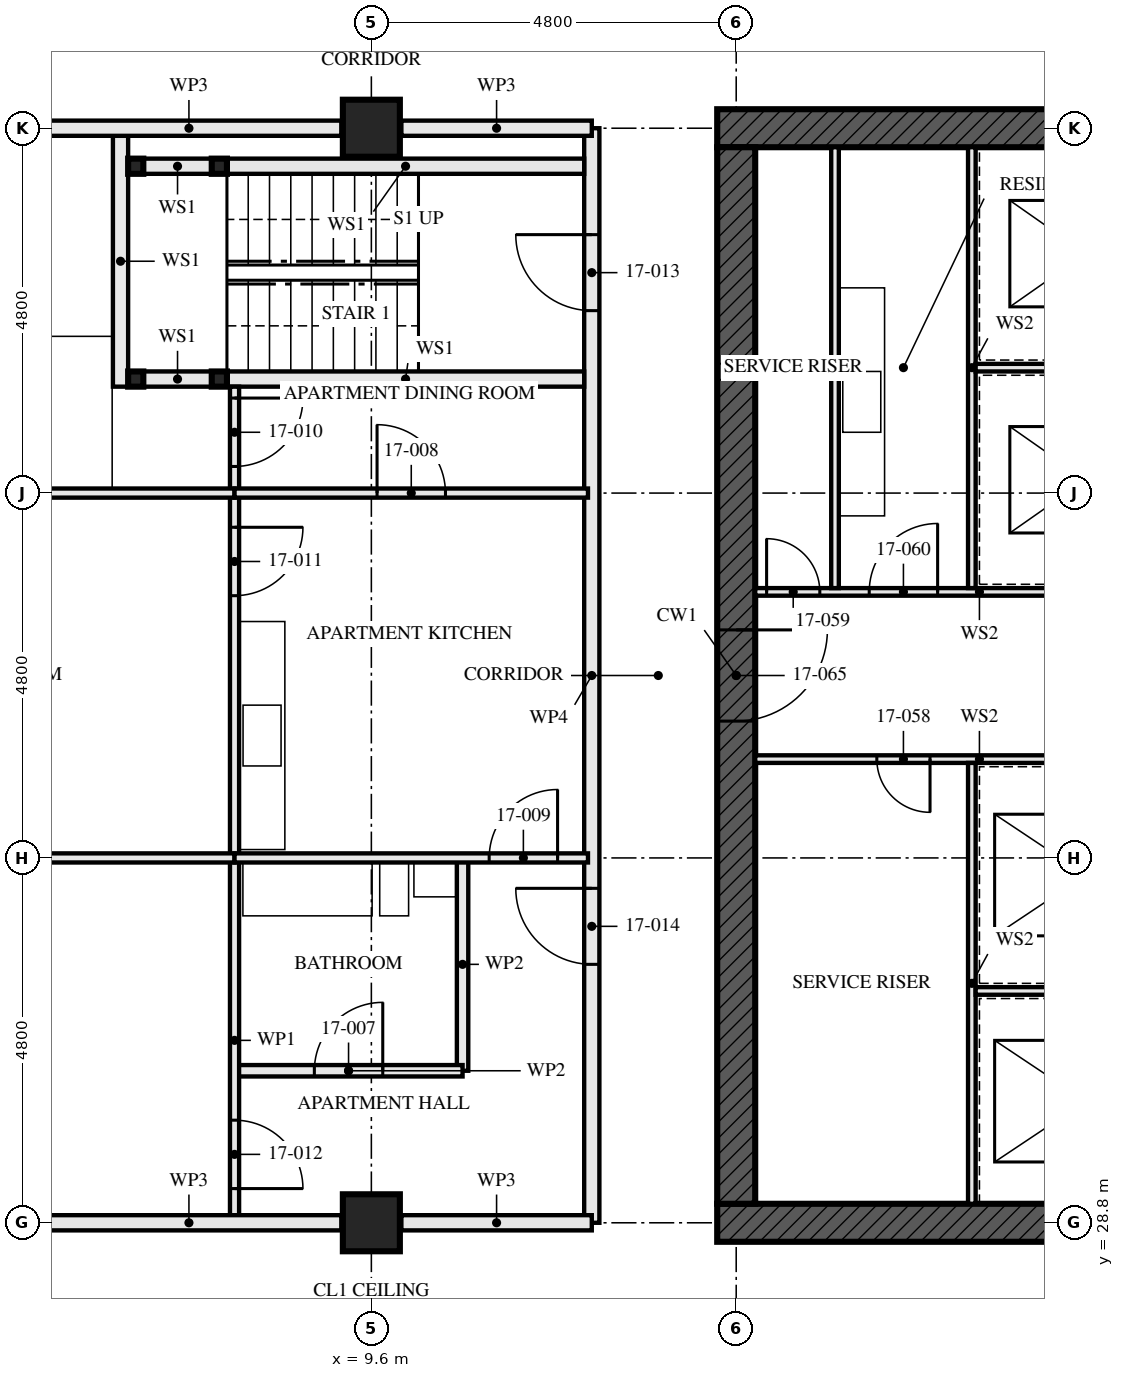
"""IFC4 building model, lengths in metres.
Left out: names, types, materials, properties, quantities, classifications, styles, units other than length and angle.
Written with IfcOpenShell. Run it as: python <this file> out.ifc"""

import sys

from ifc_helpers import new_model, si_unit, direction, frame, frame_2d, origin, origin_2d, place, context, subcontext, project, spatial, rectangle, hollow_rectangle, extrude, element, fill, save


model = new_model("IFC4")
c1 = context("Model", 3, precision=1e-05, world=origin(), true_north=direction((0.0, 1.0)))
c2 = subcontext(c1, "Body", "Model", "MODEL_VIEW")
j1 = project(units=[si_unit("LENGTHUNIT", "METRE"), si_unit("PLANEANGLEUNIT", "RADIAN")], contexts=[c1])
p1 = place(None, origin())
s1 = spatial("IfcSite", under=j1, at=p1, CompositionType="ELEMENT")
p2 = place(p1, origin())
s2 = spatial("IfcBuilding", under=s1, at=p2, CompositionType="ELEMENT")
p3 = place(p2, frame((0.0, 0.0, 65.5)))
s3 = spatial("IfcBuildingStorey", under=s2, at=p3, CompositionType="ELEMENT", Elevation=65.5)
for number, where, z_axis, x_axis in (
    (1, (9.6, 28.8, 0.0), (0.0, 0.0, 1.0), (0.0, 1.0, 0.0)),
    (2, (9.6, 43.2, 0.0), (0.0, 0.0, 1.0), (0.0, 1.0, 0.0)),
):
    element("IfcColumn", number, at=place(p3, frame(where, z_axis=z_axis, x_axis=x_axis)), inside=s3, PredefinedType="COLUMN", context=c2, shape_type="SweptSolid", body=[
        extrude(hollow_rectangle(XDim=0.75, YDim=0.75, WallThickness=0.08, at=origin_2d()), origin(), (0.0, 0.0, 1.0), 3.5),
    ])
p4 = place(p3, frame((14.15, 28.8, -0.17), z_axis=(0.0, 0.0, 1.0), x_axis=(1.0, 0.0, 0.0)))
e3 = element("IfcWall", 3, at=p4, inside=s3, PredefinedType="SHEAR", context=c2, shape_type="SweptSolid", body=[
    extrude(rectangle(XDim=14.9, YDim=0.5, at=frame_2d((7.45, 0.0))), origin(), (0.0, 0.0, 1.0), 3.5),
])
p5 = place(p4, frame((6.85, 0.0, 0.17)))
e4 = element("IfcOpeningElement", 4, at=p5, cuts=e3, PredefinedType="OPENING", context=c2, shape_type="SweptSolid", body=[
    extrude(rectangle(XDim=1.2, YDim=2.1, at=frame_2d((0.6, 1.05))), frame((0.0, 0.26, 0.0), z_axis=(0.0, -1.0, 0.0), x_axis=(1.0, 0.0, 0.0)), (0.0, 0.0, 1.0), 0.521),
])
p6 = place(p3, frame((29.05, 43.2, -0.17), z_axis=(0.0, 0.0, 1.0), x_axis=(-1.0, 0.0, 0.0)))
e5 = element("IfcWall", 5, at=p6, inside=s3, PredefinedType="SHEAR", context=c2, shape_type="SweptSolid", body=[
    extrude(rectangle(XDim=14.9, YDim=0.5, at=frame_2d((7.45, 0.0))), origin(), (0.0, 0.0, 1.0), 3.5),
])
p7 = place(p6, frame((6.85, 0.0, 0.17)))
e6 = element("IfcOpeningElement", 6, at=p7, cuts=e5, PredefinedType="OPENING", context=c2, shape_type="SweptSolid", body=[
    extrude(rectangle(XDim=1.2, YDim=2.1, at=frame_2d((0.6, 1.05))), frame((0.0, 0.26, 0.0), z_axis=(0.0, -1.0, 0.0), x_axis=(1.0, 0.0, 0.0)), (0.0, 0.0, 1.0), 0.521),
])
p8 = place(p3, frame((14.4, 42.95, -0.17), z_axis=(0.0, 0.0, 1.0), x_axis=(0.0, -1.0, 0.0)))
e7 = element("IfcWall", 7, at=p8, inside=s3, PredefinedType="SHEAR", context=c2, shape_type="SweptSolid", body=[
    extrude(rectangle(XDim=13.9, YDim=0.5, at=frame_2d((6.95, 0.0))), origin(), (0.0, 0.0, 1.0), 3.5),
])
p9 = place(p8, frame((6.35, 0.0, 0.17)))
e8 = element("IfcOpeningElement", 8, at=p9, cuts=e7, PredefinedType="OPENING", context=c2, shape_type="SweptSolid", body=[
    extrude(rectangle(XDim=1.2, YDim=2.1, at=frame_2d((0.6, 1.05))), frame((0.0, 0.26, 0.0), z_axis=(0.0, -1.0, 0.0), x_axis=(1.0, 0.0, 0.0)), (0.0, 0.0, 1.0), 0.521),
])
for number, where, z_axis, x_axis in (
    (9, (6.5, 42.7, 0.0), (0.0, 0.0, 1.0), (1.0, 0.0, 0.0)),
    (10, (6.5, 39.9, 0.0), (0.0, 0.0, 1.0), (1.0, 0.0, 0.0)),
    (11, (7.6, 42.7, 0.0), (0.0, 0.0, 1.0), (1.0, 0.0, 0.0)),
    (12, (7.6, 39.9, 0.0), (0.0, 0.0, 1.0), (1.0, 0.0, 0.0)),
):
    element("IfcColumn", number, at=place(p3, frame(where, z_axis=z_axis, x_axis=x_axis)), inside=s3, PredefinedType="COLUMN", context=c2, shape_type="SweptSolid", body=[
        extrude(hollow_rectangle(XDim=0.2, YDim=0.2, WallThickness=0.008, at=origin_2d()), origin(), (0.0, 0.0, 1.0), 3.33),
    ])
p10 = place(p3, frame((6.6, 42.7, 0.0), z_axis=(0.0, 0.0, 1.0), x_axis=(1.0, 0.0, 0.0)))
e13 = element("IfcWall", 13, at=p10, inside=s3, PredefinedType="SOLIDWALL", context=c2, shape_type="SweptSolid", body=[
    extrude(rectangle(XDim=0.9, YDim=0.2, at=frame_2d((0.45, 0.0))), origin(), (0.0, 0.0, 1.0), 2.99),
])
p11 = place(p3, frame((7.7, 42.7, 0.0), z_axis=(0.0, 0.0, 1.0), x_axis=(1.0, 0.0, 0.0)))
e14 = element("IfcWall", 14, at=p11, inside=s3, PredefinedType="SOLIDWALL", context=c2, shape_type="SweptSolid", body=[
    extrude(rectangle(XDim=4.7, YDim=0.2, at=frame_2d((2.35, 0.0))), origin(), (0.0, 0.0, 1.0), 2.99),
])
p12 = place(p3, frame((6.6, 39.9, 0.0), z_axis=(0.0, 0.0, 1.0), x_axis=(1.0, 0.0, 0.0)))
e15 = element("IfcWall", 15, at=p12, inside=s3, PredefinedType="SOLIDWALL", context=c2, shape_type="SweptSolid", body=[
    extrude(rectangle(XDim=0.9, YDim=0.2, at=frame_2d((0.45, 0.0))), origin(), (0.0, 0.0, 1.0), 2.99),
])
p13 = place(p3, frame((7.7, 39.9, 0.0), z_axis=(0.0, 0.0, 1.0), x_axis=(1.0, 0.0, 0.0)))
e16 = element("IfcWall", 16, at=p13, inside=s3, PredefinedType="SOLIDWALL", context=c2, shape_type="SweptSolid", body=[
    extrude(rectangle(XDim=4.7, YDim=0.2, at=frame_2d((2.35, 0.0))), origin(), (0.0, 0.0, 1.0), 2.99),
])
p14 = place(p3, frame((6.3, 43.1, 0.0), z_axis=(0.0, 0.0, 1.0), x_axis=(0.0, -1.0, 0.0)))
e17 = element("IfcWall", 17, at=p14, inside=s3, PredefinedType="SOLIDWALL", context=c2, shape_type="SweptSolid", body=[
    extrude(rectangle(XDim=3.3, YDim=0.2, at=frame_2d((1.65, 0.0))), origin(), (0.0, 0.0, 1.0), 3.33),
])
p15 = place(p3, frame((7.8, 30.8, 0.0), z_axis=(0.0, 0.0, 1.0), x_axis=(1.0, 0.0, 0.0)))
e18 = element("IfcWall", 18, at=p15, inside=s3, PredefinedType="PARTITIONING", context=c2, shape_type="SweptSolid", body=[
    extrude(rectangle(XDim=3.0, YDim=0.15, at=frame_2d((1.5, 0.0))), origin(), (0.0, 0.0, 1.0), 3.33),
])
p16 = place(p15, frame((1.05, 0.0, 0.0)))
e19 = element("IfcOpeningElement", 19, at=p16, cuts=e18, PredefinedType="OPENING", context=c2, shape_type="SweptSolid", body=[
    extrude(rectangle(XDim=0.9, YDim=2.1, at=frame_2d((0.45, 1.05))), frame((0.0, 0.085, 0.0), z_axis=(0.0, -1.0, 0.0), x_axis=(1.0, 0.0, 0.0)), (0.0, 0.0, 1.0), 0.171),
])
p17 = place(p3, frame((10.8, 33.6, 0.0), z_axis=(0.0, 0.0, 1.0), x_axis=(0.0, -1.0, 0.0)))
e20 = element("IfcWall", 20, at=p17, inside=s3, PredefinedType="PARTITIONING", context=c2, shape_type="SweptSolid", body=[
    extrude(rectangle(XDim=2.8, YDim=0.15, at=frame_2d((1.4, 0.0))), origin(), (0.0, 0.0, 1.0), 3.33),
])
p18 = place(p3, frame((7.8, 38.4, 0.0), z_axis=(0.0, 0.0, 1.0), x_axis=(1.0, 0.0, 0.0)))
e21 = element("IfcWall", 21, at=p18, inside=s3, PredefinedType="PARTITIONING", context=c2, shape_type="SweptSolid", body=[
    extrude(rectangle(XDim=4.65, YDim=0.12, at=frame_2d((2.325, 0.0))), origin(), (0.0, 0.0, 1.0), 2.55),
])
p19 = place(p18, frame((1.875, 0.0, 0.0)))
e22 = element("IfcOpeningElement", 22, at=p19, cuts=e21, PredefinedType="OPENING", context=c2, shape_type="SweptSolid", body=[
    extrude(rectangle(XDim=0.9, YDim=2.1, at=frame_2d((0.45, 1.05))), frame((0.0, 0.071, 0.0), z_axis=(0.0, -1.0, 0.0), x_axis=(1.0, 0.0, 0.0)), (0.0, 0.0, 1.0), 0.141),
])
p20 = place(p3, frame((7.8, 33.6, 0.0), z_axis=(0.0, 0.0, 1.0), x_axis=(1.0, 0.0, 0.0)))
e23 = element("IfcWall", 23, at=p20, inside=s3, PredefinedType="PARTITIONING", context=c2, shape_type="SweptSolid", body=[
    extrude(rectangle(XDim=4.65, YDim=0.12, at=frame_2d((2.325, 0.0))), origin(), (0.0, 0.0, 1.0), 2.55),
])
p21 = place(p20, frame((3.35, 0.0, 0.0)))
e24 = element("IfcOpeningElement", 24, at=p21, cuts=e23, PredefinedType="OPENING", context=c2, shape_type="SweptSolid", body=[
    extrude(rectangle(XDim=0.9, YDim=2.1, at=frame_2d((0.45, 1.05))), frame((0.0, 0.071, 0.0), z_axis=(0.0, -1.0, 0.0), x_axis=(1.0, 0.0, 0.0)), (0.0, 0.0, 1.0), 0.141),
])
p22 = place(p3, frame((7.8, 39.8, 0.0), z_axis=(0.0, 0.0, 1.0), x_axis=(0.0, -1.0, 0.0)))
e25 = element("IfcWall", 25, at=p22, inside=s3, PredefinedType="PARTITIONING", context=c2, shape_type="SweptSolid", body=[
    extrude(rectangle(XDim=1.4, YDim=0.12, at=frame_2d((0.7, 0.0))), origin(), (0.0, 0.0, 1.0), 3.33),
])
p23 = place(p22, frame((0.15, 0.0, 0.0)))
e26 = element("IfcOpeningElement", 26, at=p23, cuts=e25, PredefinedType="OPENING", context=c2, shape_type="SweptSolid", body=[
    extrude(rectangle(XDim=0.9, YDim=2.1, at=frame_2d((0.45, 1.05))), frame((0.0, 0.071, 0.0), z_axis=(0.0, -1.0, 0.0), x_axis=(1.0, 0.0, 0.0)), (0.0, 0.0, 1.0), 0.141),
])
p24 = place(p3, frame((7.8, 38.4, 0.0), z_axis=(0.0, 0.0, 1.0), x_axis=(0.0, -1.0, 0.0)))
e27 = element("IfcWall", 27, at=p24, inside=s3, PredefinedType="PARTITIONING", context=c2, shape_type="SweptSolid", body=[
    extrude(rectangle(XDim=4.8, YDim=0.12, at=frame_2d((2.4, 0.0))), origin(), (0.0, 0.0, 1.0), 3.33),
])
p25 = place(p24, frame((0.45, 0.0, 0.0)))
e28 = element("IfcOpeningElement", 28, at=p25, cuts=e27, PredefinedType="OPENING", context=c2, shape_type="SweptSolid", body=[
    extrude(rectangle(XDim=0.9, YDim=2.1, at=frame_2d((0.45, 1.05))), frame((0.0, 0.071, 0.0), z_axis=(0.0, -1.0, 0.0), x_axis=(1.0, 0.0, 0.0)), (0.0, 0.0, 1.0), 0.141),
])
p26 = place(p3, frame((7.8, 33.6, 0.0), z_axis=(0.0, 0.0, 1.0), x_axis=(0.0, -1.0, 0.0)))
e29 = element("IfcWall", 29, at=p26, inside=s3, PredefinedType="PARTITIONING", context=c2, shape_type="SweptSolid", body=[
    extrude(rectangle(XDim=4.8, YDim=0.12, at=frame_2d((2.4, 0.0))), origin(), (0.0, 0.0, 1.0), 3.33),
])
p27 = place(p26, frame((3.45, 0.0, 0.0)))
e30 = element("IfcOpeningElement", 30, at=p27, cuts=e29, PredefinedType="OPENING", context=c2, shape_type="SweptSolid", body=[
    extrude(rectangle(XDim=0.9, YDim=2.1, at=frame_2d((0.45, 1.05))), frame((0.0, 0.071, 0.0), z_axis=(0.0, -1.0, 0.0), x_axis=(1.0, 0.0, 0.0)), (0.0, 0.0, 1.0), 0.141),
])
for number, where, z_axis, x_axis in (
    (31, (0.32, 38.4, 0.0), (0.0, 0.0, 1.0), (1.0, 0.0, 0.0)),
    (32, (0.32, 33.6, 0.0), (0.0, 0.0, 1.0), (1.0, 0.0, 0.0)),
):
    element("IfcWall", number, at=place(p3, frame(where, z_axis=z_axis, x_axis=x_axis)), inside=s3, PredefinedType="PARTITIONING", context=c2, shape_type="SweptSolid", body=[
        extrude(rectangle(XDim=7.48, YDim=0.12, at=frame_2d((3.74, 0.0))), origin(), (0.0, 0.0, 1.0), 2.55),
    ])
p28 = place(p3, frame((12.5, 43.2, 0.0), z_axis=(0.0, 0.0, 1.0), x_axis=(0.0, -1.0, 0.0)))
e33 = element("IfcWall", 33, at=p28, inside=s3, PredefinedType="PARTITIONING", context=c2, shape_type="SweptSolid", body=[
    extrude(rectangle(XDim=14.4, YDim=0.2, at=frame_2d((7.2, 0.0))), origin(), (0.0, 0.0, 1.0), 2.55),
])
p29 = place(p28, frame((1.4, 0.0, 0.0)))
e34 = element("IfcOpeningElement", 34, at=p29, cuts=e33, PredefinedType="OPENING", context=c2, shape_type="SweptSolid", body=[
    extrude(rectangle(XDim=1.0, YDim=2.1, at=frame_2d((0.5, 1.05))), frame((0.0, 0.111, 0.0), z_axis=(0.0, -1.0, 0.0), x_axis=(1.0, 0.0, 0.0)), (0.0, 0.0, 1.0), 0.221),
])
p30 = place(p28, frame((10.0, 0.0, 0.0)))
e35 = element("IfcOpeningElement", 35, at=p30, cuts=e33, PredefinedType="OPENING", context=c2, shape_type="SweptSolid", body=[
    extrude(rectangle(XDim=1.0, YDim=2.1, at=frame_2d((0.5, 1.05))), frame((0.0, 0.111, 0.0), z_axis=(0.0, -1.0, 0.0), x_axis=(1.0, 0.0, 0.0)), (0.0, 0.0, 1.0), 0.221),
])
p31 = place(p3, frame((15.7, 37.15, 0.0), z_axis=(0.0, 0.0, 1.0), x_axis=(0.0, 1.0, 0.0)))
e36 = element("IfcWall", 36, at=p31, inside=s3, PredefinedType="SOLIDWALL", context=c2, shape_type="SweptSolid", body=[
    extrude(rectangle(XDim=5.8, YDim=0.1, at=frame_2d((2.9, 0.0))), origin(), (0.0, 0.0, 1.0), 3.33),
])
p32 = place(p3, frame((14.65, 34.9, 0.0), z_axis=(0.0, 0.0, 1.0), x_axis=(1.0, 0.0, 0.0)))
e37 = element("IfcWall", 37, at=p32, inside=s3, PredefinedType="SOLIDWALL", context=c2, shape_type="SweptSolid", body=[
    extrude(rectangle(XDim=5.9, YDim=0.1, at=frame_2d((2.95, 0.0))), origin(), (0.0, 0.0, 1.0), 3.33),
])
p33 = place(p32, frame((1.6, 0.0, 0.0)))
e38 = element("IfcOpeningElement", 38, at=p33, cuts=e37, PredefinedType="OPENING", context=c2, shape_type="SweptSolid", body=[
    extrude(rectangle(XDim=0.7, YDim=2.1, at=frame_2d((0.35, 1.05))), frame((0.0, 0.061, 0.0), z_axis=(0.0, -1.0, 0.0), x_axis=(1.0, 0.0, 0.0)), (0.0, 0.0, 1.0), 0.121),
])
p34 = place(p3, frame((14.65, 37.1, 0.0), z_axis=(0.0, 0.0, 1.0), x_axis=(1.0, 0.0, 0.0)))
e39 = element("IfcWall", 39, at=p34, inside=s3, PredefinedType="SOLIDWALL", context=c2, shape_type="SweptSolid", body=[
    extrude(rectangle(XDim=5.9, YDim=0.1, at=frame_2d((2.95, 0.0))), origin(), (0.0, 0.0, 1.0), 3.33),
])
p35 = place(p34, frame((0.15, 0.0, 0.0)))
e40 = element("IfcOpeningElement", 40, at=p35, cuts=e39, PredefinedType="OPENING", context=c2, shape_type="SweptSolid", body=[
    extrude(rectangle(XDim=0.7, YDim=2.1, at=frame_2d((0.35, 1.05))), frame((0.0, 0.061, 0.0), z_axis=(0.0, -1.0, 0.0), x_axis=(1.0, 0.0, 0.0)), (0.0, 0.0, 1.0), 0.121),
])
p36 = place(p34, frame((1.5, 0.0, 0.0)))
e41 = element("IfcOpeningElement", 41, at=p36, cuts=e39, PredefinedType="OPENING", context=c2, shape_type="SweptSolid", body=[
    extrude(rectangle(XDim=0.9, YDim=2.1, at=frame_2d((0.45, 1.05))), frame((0.0, 0.061, 0.0), z_axis=(0.0, -1.0, 0.0), x_axis=(1.0, 0.0, 0.0)), (0.0, 0.0, 1.0), 0.121),
])
p37 = place(p3, frame((17.5, 29.05, 0.0), z_axis=(0.0, 0.0, 1.0), x_axis=(0.0, 1.0, 0.0)))
e42 = element("IfcWall", 42, at=p37, inside=s3, PredefinedType="SOLIDWALL", context=c2, shape_type="SweptSolid", body=[
    extrude(rectangle(XDim=5.8, YDim=0.1, at=frame_2d((2.9, 0.0))), origin(), (0.0, 0.0, 1.0), 3.33),
])
p38 = place(p3, frame((17.55, 31.85, 0.0), z_axis=(0.0, 0.0, 1.0), x_axis=(1.0, 0.0, 0.0)))
e43 = element("IfcWall", 43, at=p38, inside=s3, PredefinedType="SOLIDWALL", context=c2, shape_type="SweptSolid", body=[
    extrude(rectangle(XDim=2.9, YDim=0.1, at=frame_2d((1.45, 0.0))), origin(), (0.0, 0.0, 1.0), 3.33),
])
p39 = place(p3, frame((17.5, 37.15, 0.0), z_axis=(0.0, 0.0, 1.0), x_axis=(0.0, 1.0, 0.0)))
e44 = element("IfcWall", 44, at=p39, inside=s3, PredefinedType="SOLIDWALL", context=c2, shape_type="SweptSolid", body=[
    extrude(rectangle(XDim=5.8, YDim=0.1, at=frame_2d((2.9, 0.0))), origin(), (0.0, 0.0, 1.0), 3.33),
])
p40 = place(p3, frame((17.55, 40.05, 0.0), z_axis=(0.0, 0.0, 1.0), x_axis=(1.0, 0.0, 0.0)))
e45 = element("IfcWall", 45, at=p40, inside=s3, PredefinedType="SOLIDWALL", context=c2, shape_type="SweptSolid", body=[
    extrude(rectangle(XDim=2.9, YDim=0.1, at=frame_2d((1.45, 0.0))), origin(), (0.0, 0.0, 1.0), 3.33),
])
p41 = place(p3, frame((12.5, 28.8, 0.0), z_axis=(0.0, 0.0, 1.0), x_axis=(-1.0, 0.0, 0.0)))
e46 = element("IfcWall", 46, at=p41, inside=s3, PredefinedType="PARTITIONING", context=c2, shape_type="SweptSolid", body=[
    extrude(rectangle(XDim=2.505, YDim=0.2, at=frame_2d((1.252, 0.0))), origin(), (0.0, 0.0, 1.0), 2.32),
])
p42 = place(p3, frame((9.205, 28.8, 0.0), z_axis=(0.0, 0.0, 1.0), x_axis=(-1.0, 0.0, 0.0)))
e47 = element("IfcWall", 47, at=p42, inside=s3, PredefinedType="PARTITIONING", context=c2, shape_type="SweptSolid", body=[
    extrude(rectangle(XDim=4.01, YDim=0.2, at=frame_2d((2.005, 0.0))), origin(), (0.0, 0.0, 1.0), 2.32),
])
p43 = place(p3, frame((12.5, 43.2, 0.0), z_axis=(0.0, 0.0, 1.0), x_axis=(-1.0, 0.0, 0.0)))
e48 = element("IfcWall", 48, at=p43, inside=s3, PredefinedType="PARTITIONING", context=c2, shape_type="SweptSolid", body=[
    extrude(rectangle(XDim=2.505, YDim=0.2, at=frame_2d((1.252, 0.0))), origin(), (0.0, 0.0, 1.0), 2.32),
])
p44 = place(p3, frame((9.205, 43.2, 0.0), z_axis=(0.0, 0.0, 1.0), x_axis=(-1.0, 0.0, 0.0)))
e49 = element("IfcWall", 49, at=p44, inside=s3, PredefinedType="PARTITIONING", context=c2, shape_type="SweptSolid", body=[
    extrude(rectangle(XDim=4.01, YDim=0.2, at=frame_2d((2.005, 0.0))), origin(), (0.0, 0.0, 1.0), 2.32),
])
p45 = place(p16, origin())
e50 = element("IfcDoor", 50, at=p45, inside=s3, OperationType="SINGLE_SWING_LEFT", PredefinedType="DOOR", context=c2, shape_type="SweptSolid", body=[
    extrude(rectangle(XDim=0.9, YDim=2.1, at=frame_2d((0.45, 1.05))), frame((0.0, 0.022, 0.0), z_axis=(0.0, -1.0, 0.0), x_axis=(1.0, 0.0, 0.0)), (0.0, 0.0, 1.0), 0.044),
])
fill(e19, e50)
p46 = place(p19, origin())
e51 = element("IfcDoor", 51, at=p46, inside=s3, OperationType="SINGLE_SWING_RIGHT", PredefinedType="DOOR", context=c2, shape_type="SweptSolid", body=[
    extrude(rectangle(XDim=0.9, YDim=2.1, at=frame_2d((0.45, 1.05))), frame((0.0, 0.022, 0.0), z_axis=(0.0, -1.0, 0.0), x_axis=(1.0, 0.0, 0.0)), (0.0, 0.0, 1.0), 0.044),
])
fill(e22, e51)
p47 = place(p21, origin())
e52 = element("IfcDoor", 52, at=p47, inside=s3, OperationType="SINGLE_SWING_LEFT", PredefinedType="DOOR", context=c2, shape_type="SweptSolid", body=[
    extrude(rectangle(XDim=0.9, YDim=2.1, at=frame_2d((0.45, 1.05))), frame((0.0, 0.022, 0.0), z_axis=(0.0, -1.0, 0.0), x_axis=(1.0, 0.0, 0.0)), (0.0, 0.0, 1.0), 0.044),
])
fill(e24, e52)
p48 = place(p23, origin())
e53 = element("IfcDoor", 53, at=p48, inside=s3, OperationType="SINGLE_SWING_RIGHT", PredefinedType="DOOR", context=c2, shape_type="SweptSolid", body=[
    extrude(rectangle(XDim=0.9, YDim=2.1, at=frame_2d((0.45, 1.05))), frame((0.0, 0.022, 0.0), z_axis=(0.0, -1.0, 0.0), x_axis=(1.0, 0.0, 0.0)), (0.0, 0.0, 1.0), 0.044),
])
fill(e26, e53)
p49 = place(p25, origin())
e54 = element("IfcDoor", 54, at=p49, inside=s3, OperationType="SINGLE_SWING_RIGHT", PredefinedType="DOOR", context=c2, shape_type="SweptSolid", body=[
    extrude(rectangle(XDim=0.9, YDim=2.1, at=frame_2d((0.45, 1.05))), frame((0.0, 0.022, 0.0), z_axis=(0.0, -1.0, 0.0), x_axis=(1.0, 0.0, 0.0)), (0.0, 0.0, 1.0), 0.044),
])
fill(e28, e54)
p50 = place(p27, origin())
e55 = element("IfcDoor", 55, at=p50, inside=s3, OperationType="SINGLE_SWING_LEFT", PredefinedType="DOOR", context=c2, shape_type="SweptSolid", body=[
    extrude(rectangle(XDim=0.9, YDim=2.1, at=frame_2d((0.45, 1.05))), frame((0.0, 0.022, 0.0), z_axis=(0.0, -1.0, 0.0), x_axis=(1.0, 0.0, 0.0)), (0.0, 0.0, 1.0), 0.044),
])
fill(e30, e55)
p51 = place(p29, frame((1.0, 0.0, 0.0), z_axis=(0.0, 0.0, 1.0), x_axis=(-1.0, 0.0, 0.0)))
e56 = element("IfcDoor", 56, at=p51, inside=s3, OperationType="SINGLE_SWING_LEFT", PredefinedType="DOOR", context=c2, shape_type="SweptSolid", body=[
    extrude(rectangle(XDim=1.0, YDim=2.1, at=frame_2d((0.5, 1.05))), frame((0.0, 0.032, 0.0), z_axis=(0.0, -1.0, 0.0), x_axis=(1.0, 0.0, 0.0)), (0.0, 0.0, 1.0), 0.064),
])
fill(e34, e56)
p52 = place(p30, frame((1.0, 0.0, 0.0), z_axis=(0.0, 0.0, 1.0), x_axis=(-1.0, 0.0, 0.0)))
e57 = element("IfcDoor", 57, at=p52, inside=s3, OperationType="SINGLE_SWING_LEFT", PredefinedType="DOOR", context=c2, shape_type="SweptSolid", body=[
    extrude(rectangle(XDim=1.0, YDim=2.1, at=frame_2d((0.5, 1.05))), frame((0.0, 0.027, 0.0), z_axis=(0.0, -1.0, 0.0), x_axis=(1.0, 0.0, 0.0)), (0.0, 0.0, 1.0), 0.054),
])
fill(e35, e57)
p53 = place(p33, frame((0.7, 0.0, 0.0), z_axis=(0.0, 0.0, 1.0), x_axis=(-1.0, 0.0, 0.0)))
e58 = element("IfcDoor", 58, at=p53, inside=s3, OperationType="SINGLE_SWING_RIGHT", PredefinedType="DOOR", context=c2, shape_type="SweptSolid", body=[
    extrude(rectangle(XDim=0.7, YDim=2.1, at=frame_2d((0.35, 1.05))), frame((0.0, 0.027, 0.0), z_axis=(0.0, -1.0, 0.0), x_axis=(1.0, 0.0, 0.0)), (0.0, 0.0, 1.0), 0.054),
])
fill(e38, e58)
p54 = place(p35, origin())
e59 = element("IfcDoor", 59, at=p54, inside=s3, OperationType="SINGLE_SWING_RIGHT", PredefinedType="DOOR", context=c2, shape_type="SweptSolid", body=[
    extrude(rectangle(XDim=0.7, YDim=2.1, at=frame_2d((0.35, 1.05))), frame((0.0, 0.027, 0.0), z_axis=(0.0, -1.0, 0.0), x_axis=(1.0, 0.0, 0.0)), (0.0, 0.0, 1.0), 0.054),
])
fill(e40, e59)
p55 = place(p36, origin())
e60 = element("IfcDoor", 60, at=p55, inside=s3, OperationType="SINGLE_SWING_LEFT", PredefinedType="DOOR", context=c2, shape_type="SweptSolid", body=[
    extrude(rectangle(XDim=0.9, YDim=2.1, at=frame_2d((0.45, 1.05))), frame((0.0, 0.027, 0.0), z_axis=(0.0, -1.0, 0.0), x_axis=(1.0, 0.0, 0.0)), (0.0, 0.0, 1.0), 0.054),
])
fill(e41, e60)
p56 = place(p9, origin())
e61 = element("IfcDoor", 61, at=p56, inside=s3, OperationType="SINGLE_SWING_LEFT", PredefinedType="DOOR", context=c2, shape_type="SweptSolid", body=[
    extrude(rectangle(XDim=1.2, YDim=2.1, at=frame_2d((0.6, 1.05))), frame((0.0, 0.027, 0.0), z_axis=(0.0, -1.0, 0.0), x_axis=(1.0, 0.0, 0.0)), (0.0, 0.0, 1.0), 0.054),
])
fill(e8, e61)
save(model, sys.argv[1])
